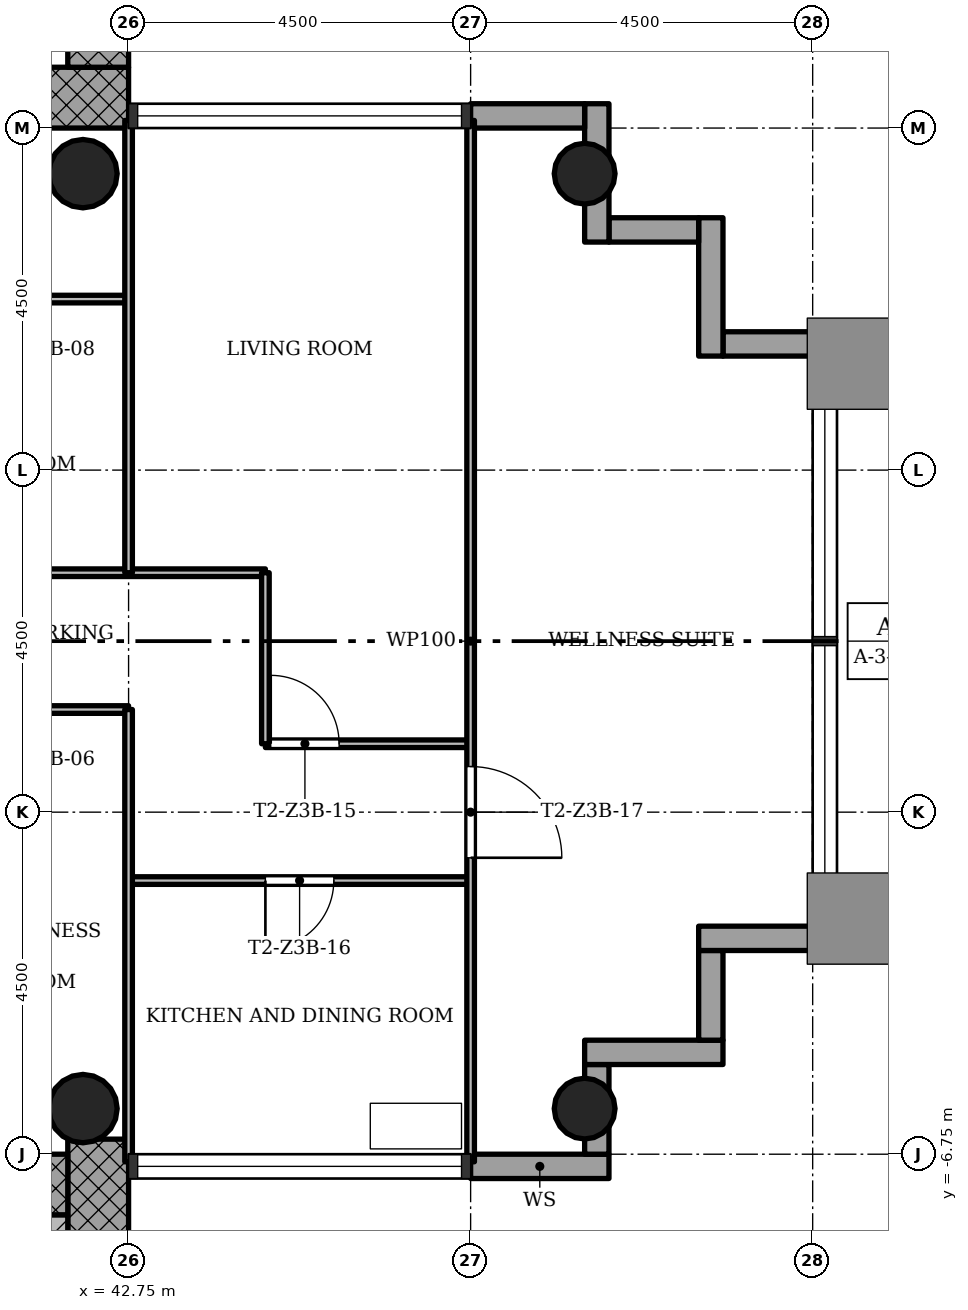
"""IFC4 building model, lengths in metres.
Left out: names, types, materials, properties, quantities, classifications, styles, units other than length and angle.
Written with IfcOpenShell. Run it as: python <this file> out.ifc"""

import sys

from ifc_helpers import new_model, si_unit, direction, frame, frame_2d, origin, origin_2d, place, context, subcontext, project, spatial, rectangle, hollow_circle, extrude, element, fill, save


model = new_model("IFC4")
c1 = context("Model", 3, precision=1e-05, world=origin(), true_north=direction((0.0, 1.0)))
c2 = subcontext(c1, "Body", "Model", "MODEL_VIEW")
j1 = project(units=[si_unit("LENGTHUNIT", "METRE"), si_unit("PLANEANGLEUNIT", "RADIAN")], contexts=[c1])
p1 = place(None, origin())
s1 = spatial("IfcSite", under=j1, at=p1, CompositionType="ELEMENT")
p2 = place(p1, origin())
s2 = spatial("IfcBuilding", under=s1, at=p2, CompositionType="ELEMENT")
p3 = place(p2, frame((0.0, 0.0, 143.9)))
s3 = spatial("IfcBuildingStorey", under=s2, at=p3, CompositionType="ELEMENT", Elevation=143.9)
p4 = place(p3, frame((30.05, 7.15, 0.0), z_axis=(0.0, 0.0, 1.0), x_axis=(1.0, 0.0, 0.0)))
e1 = element("IfcWall", 1, at=p4, inside=s3, PredefinedType="SHEAR", context=c2, shape_type="SweptSolid", body=[
    extrude(rectangle(XDim=12.7, YDim=0.8, at=frame_2d((6.35, 0.0))), origin(), (0.0, 0.0, 1.0), 3.4),
])
p5 = place(p4, frame((5.05, 0.0, 0.0)))
e2 = element("IfcOpeningElement", 2, at=p5, cuts=e1, PredefinedType="OPENING", context=c2, shape_type="SweptSolid", body=[
    extrude(rectangle(XDim=1.8, YDim=2.1, at=frame_2d((0.9, 1.05))), frame((0.0, 0.41, 0.0), z_axis=(0.0, -1.0, 0.0), x_axis=(1.0, 0.0, 0.0)), (0.0, 0.0, 1.0), 0.82),
])
p6 = place(p3, frame((42.35, 7.55, 0.0), z_axis=(0.0, 0.0, 1.0), x_axis=(0.0, 1.0, 0.0)))
e3 = element("IfcWall", 3, at=p6, inside=s3, PredefinedType="SHEAR", context=c2, shape_type="SweptSolid", body=[
    extrude(rectangle(XDim=8.2, YDim=0.8, at=frame_2d((4.1, 0.0))), origin(), (0.0, 0.0, 1.0), 3.4),
])
p7 = place(p3, frame((42.35, -14.95, 0.0), z_axis=(0.0, 0.0, 1.0), x_axis=(0.0, 1.0, 0.0)))
e4 = element("IfcWall", 4, at=p7, inside=s3, PredefinedType="SHEAR", context=c2, shape_type="SweptSolid", body=[
    extrude(rectangle(XDim=8.398, YDim=0.8, at=frame_2d((4.199, 0.0))), origin(), (0.0, 0.0, 1.0), 3.4),
])
p8 = place(p3, frame((41.95, -7.15, 0.0), z_axis=(0.0, 0.0, 1.0), x_axis=(-1.0, 0.0, 0.0)))
e5 = element("IfcWall", 5, at=p8, inside=s3, PredefinedType="SHEAR", context=c2, shape_type="SweptSolid", body=[
    extrude(rectangle(XDim=12.7, YDim=0.8, at=frame_2d((6.35, 0.0))), origin(), (0.0, 0.0, 1.0), 3.4),
])
p9 = place(p8, frame((5.05, 0.0, 0.0)))
e6 = element("IfcOpeningElement", 6, at=p9, cuts=e5, PredefinedType="OPENING", context=c2, shape_type="SweptSolid", body=[
    extrude(rectangle(XDim=1.8, YDim=2.1, at=frame_2d((0.9, 1.05))), frame((0.0, 0.41, 0.0), z_axis=(0.0, -1.0, 0.0), x_axis=(1.0, 0.0, 0.0)), (0.0, 0.0, 1.0), 0.82),
])
for number, where, z_axis, x_axis in (
    (7, (48.75, -6.15, 0.0), (0.0, 0.0, 1.0), (1.0, 0.0, 0.0)),
    (8, (48.75, 6.15, 0.0), (0.0, 0.0, 1.0), (1.0, 0.0, 0.0)),
):
    element("IfcColumn", number, at=place(p3, frame(where, z_axis=z_axis, x_axis=x_axis)), inside=s3, PredefinedType="COLUMN", context=c2, shape_type="SweptSolid", body=[
        extrude(hollow_circle(Radius=0.4, WallThickness=0.028, at=origin_2d()), origin(), (0.0, 0.0, 1.0), 3.4),
    ])
for number, where, z_axis, x_axis in (
    (9, (42.15, -6.15, 0.0), (0.0, 0.0, 1.0), (1.0, 0.0, 0.0)),
    (10, (42.15, 6.15, 0.0), (0.0, 0.0, 1.0), (1.0, 0.0, 0.0)),
):
    element("IfcColumn", number, at=place(p3, frame(where, z_axis=z_axis, x_axis=x_axis)), inside=s3, PredefinedType="COLUMN", context=c2, shape_type="SweptSolid", body=[
        extrude(hollow_circle(Radius=0.45, WallThickness=0.032, at=origin_2d()), origin(), (0.0, 0.0, 1.0), 3.4),
    ])
p10 = place(p3, frame((47.25, -6.91, -0.3), z_axis=(0.0, 0.0, 1.0), x_axis=(1.0, 0.0, 0.0)))
e11 = element("IfcWall", 11, at=p10, inside=s3, PredefinedType="STANDARD", context=c2, shape_type="SweptSolid", body=[
    extrude(rectangle(XDim=1.82, YDim=0.32, at=frame_2d((0.91, 0.0))), origin(), (0.0, 0.0, 1.0), 3.4),
])
p11 = place(p3, frame((48.91, -6.75, -0.3), z_axis=(0.0, 0.0, 1.0), x_axis=(0.0, 1.0, 0.0)))
e12 = element("IfcWall", 12, at=p11, inside=s3, PredefinedType="STANDARD", context=c2, shape_type="SweptSolid", body=[
    extrude(rectangle(XDim=1.18, YDim=0.32, at=frame_2d((0.59, 0.0))), origin(), (0.0, 0.0, 1.0), 3.4),
])
p12 = place(p3, frame((48.75, -5.41, -0.3), z_axis=(0.0, 0.0, 1.0), x_axis=(1.0, 0.0, 0.0)))
e13 = element("IfcWall", 13, at=p12, inside=s3, PredefinedType="STANDARD", context=c2, shape_type="SweptSolid", body=[
    extrude(rectangle(XDim=1.82, YDim=0.32, at=frame_2d((0.91, 0.0))), origin(), (0.0, 0.0, 1.0), 3.4),
])
p13 = place(p3, frame((50.41, -5.25, -0.3), z_axis=(0.0, 0.0, 1.0), x_axis=(0.0, 1.0, 0.0)))
e14 = element("IfcWall", 14, at=p13, inside=s3, PredefinedType="STANDARD", context=c2, shape_type="SweptSolid", body=[
    extrude(rectangle(XDim=1.18, YDim=0.32, at=frame_2d((0.59, 0.0))), origin(), (0.0, 0.0, 1.0), 3.4),
])
p14 = place(p3, frame((50.25, -3.91, -0.3), z_axis=(0.0, 0.0, 1.0), x_axis=(1.0, 0.0, 0.0)))
e15 = element("IfcWall", 15, at=p14, inside=s3, PredefinedType="STANDARD", context=c2, shape_type="SweptSolid", body=[
    extrude(rectangle(XDim=1.82, YDim=0.32, at=frame_2d((0.91, 0.0))), origin(), (0.0, 0.0, 1.0), 3.4),
])
p15 = place(p3, frame((52.07, 3.91, -0.3), z_axis=(0.0, 0.0, 1.0), x_axis=(-1.0, 0.0, 0.0)))
e16 = element("IfcWall", 16, at=p15, inside=s3, PredefinedType="STANDARD", context=c2, shape_type="SweptSolid", body=[
    extrude(rectangle(XDim=1.5, YDim=0.32, at=frame_2d((0.75, 0.0))), origin(), (0.0, 0.0, 1.0), 3.4),
])
p16 = place(p3, frame((50.41, 3.75, -0.3), z_axis=(0.0, 0.0, 1.0), x_axis=(0.0, 1.0, 0.0)))
e17 = element("IfcWall", 17, at=p16, inside=s3, PredefinedType="STANDARD", context=c2, shape_type="SweptSolid", body=[
    extrude(rectangle(XDim=1.82, YDim=0.32, at=frame_2d((0.91, 0.0))), origin(), (0.0, 0.0, 1.0), 3.4),
])
p17 = place(p3, frame((50.25, 5.41, -0.3), z_axis=(0.0, 0.0, 1.0), x_axis=(-1.0, 0.0, 0.0)))
e18 = element("IfcWall", 18, at=p17, inside=s3, PredefinedType="STANDARD", context=c2, shape_type="SweptSolid", body=[
    extrude(rectangle(XDim=1.18, YDim=0.32, at=frame_2d((0.59, 0.0))), origin(), (0.0, 0.0, 1.0), 3.4),
])
p18 = place(p3, frame((48.91, 5.25, -0.3), z_axis=(0.0, 0.0, 1.0), x_axis=(0.0, 1.0, 0.0)))
e19 = element("IfcWall", 19, at=p18, inside=s3, PredefinedType="STANDARD", context=c2, shape_type="SweptSolid", body=[
    extrude(rectangle(XDim=1.82, YDim=0.32, at=frame_2d((0.91, 0.0))), origin(), (0.0, 0.0, 1.0), 3.4),
])
p19 = place(p3, frame((48.75, 6.91, -0.3), z_axis=(0.0, 0.0, 1.0), x_axis=(-1.0, 0.0, 0.0)))
e20 = element("IfcWall", 20, at=p19, inside=s3, PredefinedType="STANDARD", context=c2, shape_type="SweptSolid", body=[
    extrude(rectangle(XDim=1.5, YDim=0.32, at=frame_2d((0.75, 0.0))), origin(), (0.0, 0.0, 1.0), 3.4),
])
p20 = place(p3, frame((47.25, -3.15, 0.0), z_axis=(0.0, 0.0, 1.0), x_axis=(-1.0, 0.0, 0.0)))
e21 = element("IfcWall", 21, at=p20, inside=s3, PredefinedType="PARTITIONING", context=c2, shape_type="SweptSolid", body=[
    extrude(rectangle(XDim=4.5, YDim=0.1, at=frame_2d((2.25, 0.0))), origin(), (0.0, 0.0, 1.0), 3.0),
])
p21 = place(p20, frame((1.8, 0.0, 0.0)))
e22 = element("IfcOpeningElement", 22, at=p21, cuts=e21, PredefinedType="OPENING", context=c2, shape_type="SweptSolid", body=[
    extrude(rectangle(XDim=0.9, YDim=2.1, at=frame_2d((0.45, 1.05))), frame((0.0, 0.06, 0.0), z_axis=(0.0, -1.0, 0.0), x_axis=(1.0, 0.0, 0.0)), (0.0, 0.0, 1.0), 0.12),
])
p22 = place(p3, frame((47.25, -1.35, 0.0), z_axis=(0.0, 0.0, 1.0), x_axis=(-1.0, 0.0, 0.0)))
e23 = element("IfcWall", 23, at=p22, inside=s3, PredefinedType="PARTITIONING", context=c2, shape_type="SweptSolid", body=[
    extrude(rectangle(XDim=2.7, YDim=0.1, at=frame_2d((1.35, 0.0))), origin(), (0.0, 0.0, 1.0), 3.0),
])
p23 = place(p22, frame((1.73, 0.0, 0.0)))
e24 = element("IfcOpeningElement", 24, at=p23, cuts=e23, PredefinedType="OPENING", context=c2, shape_type="SweptSolid", body=[
    extrude(rectangle(XDim=0.9, YDim=2.1, at=frame_2d((0.45, 1.05))), frame((0.0, 0.06, 0.0), z_axis=(0.0, -1.0, 0.0), x_axis=(1.0, 0.0, 0.0)), (0.0, 0.0, 1.0), 0.12),
])
p24 = place(p3, frame((42.75, -0.9, 0.0), z_axis=(0.0, 0.0, 1.0), x_axis=(-1.0, 0.0, 0.0)))
e25 = element("IfcWall", 25, at=p24, inside=s3, PredefinedType="PARTITIONING", context=c2, shape_type="SweptSolid", body=[
    extrude(rectangle(XDim=2.25, YDim=0.1, at=frame_2d((1.125, 0.0))), origin(), (0.0, 0.0, 1.0), 3.0),
])
p25 = place(p3, frame((44.55, 0.9, 0.0), z_axis=(0.0, 0.0, 1.0), x_axis=(-1.0, 0.0, 0.0)))
e26 = element("IfcWall", 26, at=p25, inside=s3, PredefinedType="PARTITIONING", context=c2, shape_type="SweptSolid", body=[
    extrude(rectangle(XDim=4.05, YDim=0.1, at=frame_2d((2.025, 0.0))), origin(), (0.0, 0.0, 1.0), 3.0),
])
p26 = place(p3, frame((42.75, 4.5, 0.0), z_axis=(0.0, 0.0, 1.0), x_axis=(-1.0, 0.0, 0.0)))
e27 = element("IfcWall", 27, at=p26, inside=s3, PredefinedType="PARTITIONING", context=c2, shape_type="SweptSolid", body=[
    extrude(rectangle(XDim=5.25, YDim=0.1, at=frame_2d((2.625, 0.0))), origin(), (0.0, 0.0, 1.0), 3.0),
])
p27 = place(p26, frame((3.3, 0.0, 0.0)))
e28 = element("IfcOpeningElement", 28, at=p27, cuts=e27, PredefinedType="OPENING", context=c2, shape_type="SweptSolid", body=[
    extrude(rectangle(XDim=0.9, YDim=2.1, at=frame_2d((0.45, 1.05))), frame((0.0, 0.06, 0.0), z_axis=(0.0, -1.0, 0.0), x_axis=(1.0, 0.0, 0.0)), (0.0, 0.0, 1.0), 0.12),
])
p28 = place(p3, frame((47.25, -6.85, 0.0), z_axis=(0.0, 0.0, 1.0), x_axis=(0.0, 1.0, 0.0)))
e29 = element("IfcWall", 29, at=p28, inside=s3, PredefinedType="PARTITIONING", context=c2, shape_type="SweptSolid", body=[
    extrude(rectangle(XDim=13.7, YDim=0.1, at=frame_2d((6.85, 0.0))), origin(), (0.0, 0.0, 1.0), 3.0),
])
p29 = place(p28, frame((4.0, 0.0, 0.0)))
e30 = element("IfcOpeningElement", 30, at=p29, cuts=e29, PredefinedType="OPENING", context=c2, shape_type="SweptSolid", body=[
    extrude(rectangle(XDim=1.2, YDim=2.1, at=frame_2d((0.6, 1.05))), frame((0.0, 0.06, 0.0), z_axis=(0.0, -1.0, 0.0), x_axis=(1.0, 0.0, 0.0)), (0.0, 0.0, 1.0), 0.12),
])
p30 = place(p3, frame((44.55, -1.35, 0.0), z_axis=(0.0, 0.0, 1.0), x_axis=(0.0, 1.0, 0.0)))
e31 = element("IfcWall", 31, at=p30, inside=s3, PredefinedType="PARTITIONING", context=c2, shape_type="SweptSolid", body=[
    extrude(rectangle(XDim=2.25, YDim=0.1, at=frame_2d((1.125, 0.0))), origin(), (0.0, 0.0, 1.0), 3.0),
])
for number, where, z_axis, x_axis in (
    (32, (42.75, -6.85, 0.0), (0.0, 0.0, 1.0), (0.0, 1.0, 0.0)),
    (33, (42.75, 0.9, 0.0), (0.0, 0.0, 1.0), (0.0, 1.0, 0.0)),
):
    element("IfcWall", number, at=place(p3, frame(where, z_axis=z_axis, x_axis=x_axis)), inside=s3, PredefinedType="PARTITIONING", context=c2, shape_type="SweptSolid", body=[
        extrude(rectangle(XDim=5.95, YDim=0.1, at=frame_2d((2.975, 0.0))), origin(), (0.0, 0.0, 1.0), 3.0),
    ])
p31 = place(p3, frame((37.85, -7.75, 0.0), z_axis=(0.0, 0.0, 1.0), x_axis=(1.0, 0.0, 0.0)))
e34 = element("IfcWall", 34, at=p31, inside=s3, PredefinedType="SHEAR", context=c2, shape_type="SweptSolid", body=[
    extrude(rectangle(XDim=4.1, YDim=0.4, at=frame_2d((2.05, 0.0))), origin(), (0.0, 0.0, 1.0), 3.4),
])
p32 = place(p23, origin())
e35 = element("IfcDoor", 35, at=p32, inside=s3, OperationType="SINGLE_SWING_RIGHT", PredefinedType="DOOR", context=c2, shape_type="SweptSolid", body=[
    extrude(rectangle(XDim=0.9, YDim=2.1, at=frame_2d((0.45, 1.05))), frame((0.0, 0.025, 0.0), z_axis=(0.0, -1.0, 0.0), x_axis=(1.0, 0.0, 0.0)), (0.0, 0.0, 1.0), 0.05),
])
fill(e24, e35)
p33 = place(p21, origin())
e36 = element("IfcDoor", 36, at=p33, inside=s3, OperationType="SINGLE_SWING_LEFT", PredefinedType="DOOR", context=c2, shape_type="SweptSolid", body=[
    extrude(rectangle(XDim=0.9, YDim=2.1, at=frame_2d((0.45, 1.05))), frame((0.0, 0.025, 0.0), z_axis=(0.0, -1.0, 0.0), x_axis=(1.0, 0.0, 0.0)), (0.0, 0.0, 1.0), 0.05),
])
fill(e22, e36)
p34 = place(p29, origin())
e37 = element("IfcDoor", 37, at=p34, inside=s3, OperationType="SINGLE_SWING_LEFT", PredefinedType="DOOR", context=c2, shape_type="SweptSolid", body=[
    extrude(rectangle(XDim=1.2, YDim=2.1, at=frame_2d((0.6, 1.05))), frame((0.0, 0.025, 0.0), z_axis=(0.0, -1.0, 0.0), x_axis=(1.0, 0.0, 0.0)), (0.0, 0.0, 1.0), 0.05),
])
fill(e30, e37)
save(model, sys.argv[1])
